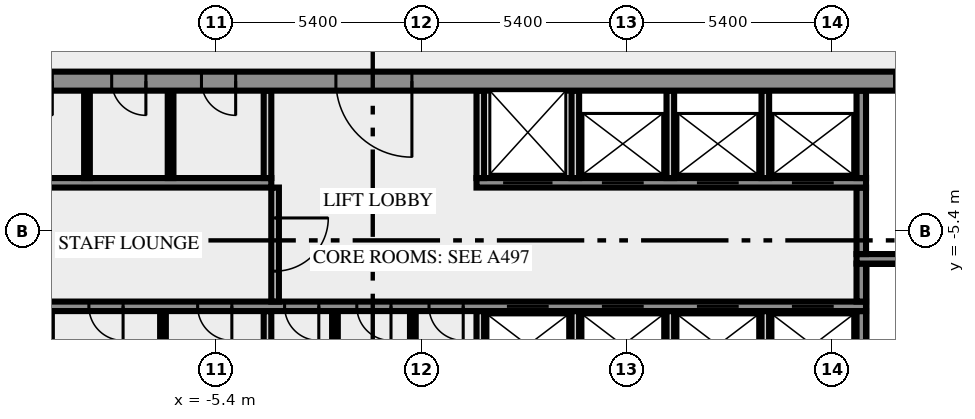
"""IFC4 building model, lengths in metres.
Left out: names, types, materials, properties, quantities, classifications, styles, units other than length and angle.
Written with IfcOpenShell. Run it as: python <this file> out.ifc"""

import sys

from ifc_helpers import new_model, si_unit, direction, frame, frame_2d, origin, place, context, subcontext, project, spatial, rectangle, extrude, element, fill, save


model = new_model("IFC4")
c1 = context("Model", 3, precision=1e-05, world=origin(), true_north=direction((0.0, 1.0)))
c2 = subcontext(c1, "Body", "Model", "MODEL_VIEW")
j1 = project(units=[si_unit("LENGTHUNIT", "METRE"), si_unit("PLANEANGLEUNIT", "RADIAN")], contexts=[c1])
p1 = place(None, origin())
s1 = spatial("IfcSite", under=j1, at=p1, CompositionType="ELEMENT")
p2 = place(p1, origin())
s2 = spatial("IfcBuilding", under=s1, at=p2, CompositionType="ELEMENT")
p3 = place(p2, frame((0.0, 0.0, 222.0)))
s3 = spatial("IfcBuildingStorey", under=s2, at=p3, CompositionType="ELEMENT", Elevation=222.0)
p4 = place(p3, frame((-6.8, -10.5, 0.0), z_axis=(0.0, 0.0, 1.0), x_axis=(0.0, 1.0, 0.0)))
e1 = element("IfcWall", 1, at=p4, inside=s3, PredefinedType="PARTITIONING", context=c2, shape_type="SweptSolid", body=[
    extrude(rectangle(XDim=3.0, YDim=0.15, at=frame_2d((1.5, 0.0))), origin(), (0.0, 0.0, 1.0), 3.65),
])
p5 = place(p3, frame((-4.05, -10.5, 0.0), z_axis=(0.0, 0.0, 1.0), x_axis=(0.0, 1.0, 0.0)))
e2 = element("IfcWall", 2, at=p5, inside=s3, PredefinedType="SOLIDWALL", context=c2, shape_type="SweptSolid", body=[
    extrude(rectangle(XDim=3.0, YDim=0.2, at=frame_2d((1.5, 0.0))), origin(), (0.0, 0.0, 1.0), 3.65),
])
for number, where, z_axis, x_axis in (
    (3, (-2.275, -10.5, 0.0), (0.0, 0.0, 1.0), (0.0, 1.0, 0.0)),
    (4, (-0.225, -10.5, 0.0), (0.0, 0.0, 1.0), (0.0, 1.0, 0.0)),
):
    element("IfcWall", number, at=place(p3, frame(where, z_axis=z_axis, x_axis=x_axis)), inside=s3, PredefinedType="PARTITIONING", context=c2, shape_type="SweptSolid", body=[
        extrude(rectangle(XDim=3.0, YDim=0.15, at=frame_2d((1.5, 0.0))), origin(), (0.0, 0.0, 1.0), 3.65),
    ])
for number, where, z_axis, x_axis in (
    (5, (1.55, -10.5, 0.0), (0.0, 0.0, 1.0), (0.0, 1.0, 0.0)),
    (6, (4.05, -10.5, 0.0), (0.0, 0.0, 1.0), (0.0, 1.0, 0.0)),
    (7, (6.55, -10.5, 0.0), (0.0, 0.0, 1.0), (0.0, 1.0, 0.0)),
    (8, (9.05, -10.5, 0.0), (0.0, 0.0, 1.0), (0.0, 1.0, 0.0)),
):
    element("IfcWall", number, at=place(p3, frame(where, z_axis=z_axis, x_axis=x_axis)), inside=s3, PredefinedType="SOLIDWALL", context=c2, shape_type="SweptSolid", body=[
        extrude(rectangle(XDim=3.0, YDim=0.2, at=frame_2d((1.5, 0.0))), origin(), (0.0, 0.0, 1.0), 3.65),
    ])
p6 = place(p3, frame((11.575, -10.5, 0.0), z_axis=(0.0, 0.0, 1.0), x_axis=(0.0, 1.0, 0.0)))
e9 = element("IfcWall", 9, at=p6, inside=s3, PredefinedType="SHEAR", context=c2, shape_type="SweptSolid", body=[
    extrude(rectangle(XDim=3.0, YDim=0.25, at=frame_2d((1.5, 0.0))), origin(), (0.0, 0.0, 1.0), 3.65),
])
p7 = place(p3, frame((11.7, -7.375, 0.0), z_axis=(0.0, 0.0, 1.0), x_axis=(-1.0, 0.0, 0.0)))
e10 = element("IfcWall", 10, at=p7, inside=s3, PredefinedType="SHEAR", context=c2, shape_type="SweptSolid", body=[
    extrude(rectangle(XDim=23.4, YDim=0.25, at=frame_2d((11.7, 0.0))), origin(), (0.0, 0.0, 1.0), 3.65),
])
p8 = place(p7, frame((21.912, 0.0, 0.0)))
e11 = element("IfcOpeningElement", 11, at=p8, cuts=e10, PredefinedType="OPENING", context=c2, shape_type="SweptSolid", body=[
    extrude(rectangle(XDim=0.9, YDim=2.1, at=frame_2d((0.45, 1.05))), frame((0.0, 0.135, 0.0), z_axis=(0.0, -1.0, 0.0), x_axis=(1.0, 0.0, 0.0)), (0.0, 0.0, 1.0), 0.27),
])
p9 = place(p7, frame((19.55, 0.0, 0.0)))
e12 = element("IfcOpeningElement", 12, at=p9, cuts=e10, PredefinedType="OPENING", context=c2, shape_type="SweptSolid", body=[
    extrude(rectangle(XDim=0.9, YDim=2.1, at=frame_2d((0.45, 1.05))), frame((0.0, 0.135, 0.0), z_axis=(0.0, -1.0, 0.0), x_axis=(1.0, 0.0, 0.0)), (0.0, 0.0, 1.0), 0.27),
])
p10 = place(p7, frame((16.688, 0.0, 0.0)))
e13 = element("IfcOpeningElement", 13, at=p10, cuts=e10, PredefinedType="OPENING", context=c2, shape_type="SweptSolid", body=[
    extrude(rectangle(XDim=0.9, YDim=2.1, at=frame_2d((0.45, 1.05))), frame((0.0, 0.135, 0.0), z_axis=(0.0, -1.0, 0.0), x_axis=(1.0, 0.0, 0.0)), (0.0, 0.0, 1.0), 0.27),
])
p11 = place(p7, frame((14.4, 0.0, 0.0)))
e14 = element("IfcOpeningElement", 14, at=p11, cuts=e10, PredefinedType="OPENING", context=c2, shape_type="SweptSolid", body=[
    extrude(rectangle(XDim=0.9, YDim=2.1, at=frame_2d((0.45, 1.05))), frame((0.0, 0.135, 0.0), z_axis=(0.0, -1.0, 0.0), x_axis=(1.0, 0.0, 0.0)), (0.0, 0.0, 1.0), 0.27),
])
p12 = place(p7, frame((12.5, 0.0, 0.0)))
e15 = element("IfcOpeningElement", 15, at=p12, cuts=e10, PredefinedType="OPENING", context=c2, shape_type="SweptSolid", body=[
    extrude(rectangle(XDim=0.9, YDim=2.1, at=frame_2d((0.45, 1.05))), frame((0.0, 0.135, 0.0), z_axis=(0.0, -1.0, 0.0), x_axis=(1.0, 0.0, 0.0)), (0.0, 0.0, 1.0), 0.27),
])
p13 = place(p7, frame((10.6, 0.0, 0.0)))
e16 = element("IfcOpeningElement", 16, at=p13, cuts=e10, PredefinedType="OPENING", context=c2, shape_type="SweptSolid", body=[
    extrude(rectangle(XDim=0.9, YDim=2.1, at=frame_2d((0.45, 1.05))), frame((0.0, 0.135, 0.0), z_axis=(0.0, -1.0, 0.0), x_axis=(1.0, 0.0, 0.0)), (0.0, 0.0, 1.0), 0.27),
])
p14 = place(p7, frame((8.35, 0.0, 0.0)))
e17 = element("IfcOpeningElement", 17, at=p14, cuts=e10, PredefinedType="OPENING", context=c2, shape_type="SweptSolid", body=[
    extrude(rectangle(XDim=1.1, YDim=2.1, at=frame_2d((0.55, 1.05))), frame((0.0, 0.135, 0.0), z_axis=(0.0, -1.0, 0.0), x_axis=(1.0, 0.0, 0.0)), (0.0, 0.0, 1.0), 0.27),
])
p15 = place(p7, frame((5.85, 0.0, 0.0)))
e18 = element("IfcOpeningElement", 18, at=p15, cuts=e10, PredefinedType="OPENING", context=c2, shape_type="SweptSolid", body=[
    extrude(rectangle(XDim=1.1, YDim=2.1, at=frame_2d((0.55, 1.05))), frame((0.0, 0.135, 0.0), z_axis=(0.0, -1.0, 0.0), x_axis=(1.0, 0.0, 0.0)), (0.0, 0.0, 1.0), 0.27),
])
p16 = place(p7, frame((3.35, 0.0, 0.0)))
e19 = element("IfcOpeningElement", 19, at=p16, cuts=e10, PredefinedType="OPENING", context=c2, shape_type="SweptSolid", body=[
    extrude(rectangle(XDim=1.1, YDim=2.1, at=frame_2d((0.55, 1.05))), frame((0.0, 0.135, 0.0), z_axis=(0.0, -1.0, 0.0), x_axis=(1.0, 0.0, 0.0)), (0.0, 0.0, 1.0), 0.27),
])
p17 = place(p7, frame((0.85, 0.0, 0.0)))
e20 = element("IfcOpeningElement", 20, at=p17, cuts=e10, PredefinedType="OPENING", context=c2, shape_type="SweptSolid", body=[
    extrude(rectangle(XDim=1.1, YDim=2.1, at=frame_2d((0.55, 1.05))), frame((0.0, 0.135, 0.0), z_axis=(0.0, -1.0, 0.0), x_axis=(1.0, 0.0, 0.0)), (0.0, 0.0, 1.0), 0.27),
])
p18 = place(p3, frame((-3.85, -4.25, 0.0), z_axis=(0.0, 0.0, 1.0), x_axis=(0.0, -1.0, 0.0)))
e21 = element("IfcWall", 21, at=p18, inside=s3, PredefinedType="SOLIDWALL", context=c2, shape_type="SweptSolid", body=[
    extrude(rectangle(XDim=3.0, YDim=0.2, at=frame_2d((1.5, 0.0))), origin(), (0.0, 0.0, 1.0), 3.65),
])
p19 = place(p18, frame((0.8, 0.0, 0.0)))
e22 = element("IfcOpeningElement", 22, at=p19, cuts=e21, PredefinedType="OPENING", context=c2, shape_type="SweptSolid", body=[
    extrude(rectangle(XDim=1.4, YDim=2.1, at=frame_2d((0.7, 1.05))), frame((0.0, 0.11, 0.0), z_axis=(0.0, -1.0, 0.0), x_axis=(1.0, 0.0, 0.0)), (0.0, 0.0, 1.0), 0.22),
])
p20 = place(p3, frame((11.575, -7.25, 0.0), z_axis=(0.0, 0.0, 1.0), x_axis=(0.0, 1.0, 0.0)))
e23 = element("IfcWall", 23, at=p20, inside=s3, PredefinedType="SHEAR", context=c2, shape_type="SweptSolid", body=[
    extrude(rectangle(XDim=1.0, YDim=0.25, at=frame_2d((0.5, 0.0))), origin(), (0.0, 0.0, 1.0), 3.65),
])
p21 = place(p3, frame((19.5, -6.125, 0.0), z_axis=(0.0, 0.0, 1.0), x_axis=(-1.0, 0.0, 0.0)))
e24 = element("IfcWall", 24, at=p21, inside=s3, PredefinedType="SHEAR", context=c2, shape_type="SweptSolid", body=[
    extrude(rectangle(XDim=8.05, YDim=0.25, at=frame_2d((4.025, 0.0))), origin(), (0.0, 0.0, 1.0), 3.65),
])
p22 = place(p21, frame((0.05, 0.0, 0.0)))
e25 = element("IfcOpeningElement", 25, at=p22, cuts=e24, PredefinedType="OPENING", context=c2, shape_type="SweptSolid", body=[
    extrude(rectangle(XDim=1.8, YDim=2.1, at=frame_2d((0.9, 1.05))), frame((0.0, 0.135, 0.0), z_axis=(0.0, -1.0, 0.0), x_axis=(1.0, 0.0, 0.0)), (0.0, 0.0, 1.0), 0.27),
])
p23 = place(p3, frame((11.575, -6.0, 0.0), z_axis=(0.0, 0.0, 1.0), x_axis=(0.0, 1.0, 0.0)))
e26 = element("IfcWall", 26, at=p23, inside=s3, PredefinedType="SHEAR", context=c2, shape_type="SweptSolid", body=[
    extrude(rectangle(XDim=1.75, YDim=0.25, at=frame_2d((0.875, 0.0))), origin(), (0.0, 0.0, 1.0), 3.65),
])
p24 = place(p3, frame((-11.7, -4.125, 0.0), z_axis=(0.0, 0.0, 1.0), x_axis=(1.0, 0.0, 0.0)))
e27 = element("IfcWall", 27, at=p24, inside=s3, PredefinedType="SHEAR", context=c2, shape_type="SweptSolid", body=[
    extrude(rectangle(XDim=7.75, YDim=0.25, at=frame_2d((3.875, 0.0))), origin(), (0.0, 0.0, 1.0), 3.65),
])
p25 = place(p3, frame((1.45, -4.125, 0.0), z_axis=(0.0, 0.0, 1.0), x_axis=(1.0, 0.0, 0.0)))
e28 = element("IfcWall", 28, at=p25, inside=s3, PredefinedType="SHEAR", context=c2, shape_type="SweptSolid", body=[
    extrude(rectangle(XDim=10.25, YDim=0.25, at=frame_2d((5.125, 0.0))), origin(), (0.0, 0.0, 1.0), 3.65),
])
p26 = place(p25, frame((0.7, 0.0, 0.0)))
e29 = element("IfcOpeningElement", 29, at=p26, cuts=e28, PredefinedType="OPENING", context=c2, shape_type="SweptSolid", body=[
    extrude(rectangle(XDim=1.3, YDim=2.1, at=frame_2d((0.65, 1.05))), frame((0.0, 0.135, 0.0), z_axis=(0.0, -1.0, 0.0), x_axis=(1.0, 0.0, 0.0)), (0.0, 0.0, 1.0), 0.27),
])
p27 = place(p25, frame((3.3, 0.0, 0.0)))
e30 = element("IfcOpeningElement", 30, at=p27, cuts=e28, PredefinedType="OPENING", context=c2, shape_type="SweptSolid", body=[
    extrude(rectangle(XDim=1.1, YDim=2.1, at=frame_2d((0.55, 1.05))), frame((0.0, 0.135, 0.0), z_axis=(0.0, -1.0, 0.0), x_axis=(1.0, 0.0, 0.0)), (0.0, 0.0, 1.0), 0.27),
])
p28 = place(p25, frame((5.8, 0.0, 0.0)))
e31 = element("IfcOpeningElement", 31, at=p28, cuts=e28, PredefinedType="OPENING", context=c2, shape_type="SweptSolid", body=[
    extrude(rectangle(XDim=1.1, YDim=2.1, at=frame_2d((0.55, 1.05))), frame((0.0, 0.135, 0.0), z_axis=(0.0, -1.0, 0.0), x_axis=(1.0, 0.0, 0.0)), (0.0, 0.0, 1.0), 0.27),
])
p29 = place(p25, frame((8.3, 0.0, 0.0)))
e32 = element("IfcOpeningElement", 32, at=p29, cuts=e28, PredefinedType="OPENING", context=c2, shape_type="SweptSolid", body=[
    extrude(rectangle(XDim=1.1, YDim=2.1, at=frame_2d((0.55, 1.05))), frame((0.0, 0.135, 0.0), z_axis=(0.0, -1.0, 0.0), x_axis=(1.0, 0.0, 0.0)), (0.0, 0.0, 1.0), 0.27),
])
for number, where, z_axis, x_axis in (
    (33, (-8.8, -4.0, 0.0), (0.0, 0.0, 1.0), (0.0, 1.0, 0.0)),
    (34, (-6.6, -4.0, 0.0), (0.0, 0.0, 1.0), (0.0, 1.0, 0.0)),
):
    element("IfcWall", number, at=place(p3, frame(where, z_axis=z_axis, x_axis=x_axis)), inside=s3, PredefinedType="PARTITIONING", context=c2, shape_type="SweptSolid", body=[
        extrude(rectangle(XDim=2.3, YDim=0.15, at=frame_2d((1.15, 0.0))), origin(), (0.0, 0.0, 1.0), 3.65),
    ])
for number, where, z_axis, x_axis in (
    (35, (-4.05, -4.0, 0.0), (0.0, 0.0, 1.0), (0.0, 1.0, 0.0)),
    (36, (1.55, -4.0, 0.0), (0.0, 0.0, 1.0), (0.0, 1.0, 0.0)),
    (37, (4.05, -4.0, 0.0), (0.0, 0.0, 1.0), (0.0, 1.0, 0.0)),
    (38, (6.55, -4.0, 0.0), (0.0, 0.0, 1.0), (0.0, 1.0, 0.0)),
    (39, (9.05, -4.0, 0.0), (0.0, 0.0, 1.0), (0.0, 1.0, 0.0)),
):
    element("IfcWall", number, at=place(p3, frame(where, z_axis=z_axis, x_axis=x_axis)), inside=s3, PredefinedType="SOLIDWALL", context=c2, shape_type="SweptSolid", body=[
        extrude(rectangle(XDim=2.3, YDim=0.2, at=frame_2d((1.15, 0.0))), origin(), (0.0, 0.0, 1.0), 3.65),
    ])
p30 = place(p3, frame((11.575, -4.0, 0.0), z_axis=(0.0, 0.0, 1.0), x_axis=(0.0, 1.0, 0.0)))
e40 = element("IfcWall", 40, at=p30, inside=s3, PredefinedType="SHEAR", context=c2, shape_type="SweptSolid", body=[
    extrude(rectangle(XDim=2.3, YDim=0.25, at=frame_2d((1.15, 0.0))), origin(), (0.0, 0.0, 1.0), 3.65),
])
p31 = place(p3, frame((20.49, -1.45, 0.0), z_axis=(0.0, 0.0, 1.0), x_axis=(-1.0, 0.0, 0.0)))
e41 = element("IfcWall", 41, at=p31, inside=s3, PredefinedType="SHEAR", context=c2, shape_type="SweptSolid", body=[
    extrude(rectangle(XDim=40.98, YDim=0.5, at=frame_2d((20.49, 0.0))), origin(), (0.0, 0.0, 1.0), 3.65),
])
p32 = place(p31, frame((38.14, 0.0, 0.0)))
e42 = element("IfcOpeningElement", 42, at=p32, cuts=e41, PredefinedType="OPENING", context=c2, shape_type="SweptSolid", body=[
    extrude(rectangle(XDim=1.8, YDim=2.1, at=frame_2d((0.9, 1.05))), frame((0.0, 0.26, 0.0), z_axis=(0.0, -1.0, 0.0), x_axis=(1.0, 0.0, 0.0)), (0.0, 0.0, 1.0), 0.52),
])
p33 = place(p31, frame((36.728, 0.0, 0.0)))
e43 = element("IfcOpeningElement", 43, at=p33, cuts=e41, PredefinedType="OPENING", context=c2, shape_type="SweptSolid", body=[
    extrude(rectangle(XDim=0.8, YDim=2.1, at=frame_2d((0.4, 1.05))), frame((0.0, 0.26, 0.0), z_axis=(0.0, -1.0, 0.0), x_axis=(1.0, 0.0, 0.0)), (0.0, 0.0, 1.0), 0.52),
])
p34 = place(p31, frame((35.153, 0.0, 0.0)))
e44 = element("IfcOpeningElement", 44, at=p34, cuts=e41, PredefinedType="OPENING", context=c2, shape_type="SweptSolid", body=[
    extrude(rectangle(XDim=0.8, YDim=2.1, at=frame_2d((0.4, 1.05))), frame((0.0, 0.26, 0.0), z_axis=(0.0, -1.0, 0.0), x_axis=(1.0, 0.0, 0.0)), (0.0, 0.0, 1.0), 0.52),
])
p35 = place(p31, frame((32.94, 0.0, 0.0)))
e45 = element("IfcOpeningElement", 45, at=p35, cuts=e41, PredefinedType="OPENING", context=c2, shape_type="SweptSolid", body=[
    extrude(rectangle(XDim=0.9, YDim=2.1, at=frame_2d((0.45, 1.05))), frame((0.0, 0.26, 0.0), z_axis=(0.0, -1.0, 0.0), x_axis=(1.0, 0.0, 0.0)), (0.0, 0.0, 1.0), 0.52),
])
p36 = place(p31, frame((30.202, 0.0, 0.0)))
e46 = element("IfcOpeningElement", 46, at=p36, cuts=e41, PredefinedType="OPENING", context=c2, shape_type="SweptSolid", body=[
    extrude(rectangle(XDim=0.9, YDim=2.1, at=frame_2d((0.45, 1.05))), frame((0.0, 0.26, 0.0), z_axis=(0.0, -1.0, 0.0), x_axis=(1.0, 0.0, 0.0)), (0.0, 0.0, 1.0), 0.52),
])
p37 = place(p31, frame((27.74, 0.0, 0.0)))
e47 = element("IfcOpeningElement", 47, at=p37, cuts=e41, PredefinedType="OPENING", context=c2, shape_type="SweptSolid", body=[
    extrude(rectangle(XDim=0.9, YDim=2.1, at=frame_2d((0.45, 1.05))), frame((0.0, 0.26, 0.0), z_axis=(0.0, -1.0, 0.0), x_axis=(1.0, 0.0, 0.0)), (0.0, 0.0, 1.0), 0.52),
])
p38 = place(p31, frame((25.377, 0.0, 0.0)))
e48 = element("IfcOpeningElement", 48, at=p38, cuts=e41, PredefinedType="OPENING", context=c2, shape_type="SweptSolid", body=[
    extrude(rectangle(XDim=0.9, YDim=2.1, at=frame_2d((0.45, 1.05))), frame((0.0, 0.26, 0.0), z_axis=(0.0, -1.0, 0.0), x_axis=(1.0, 0.0, 0.0)), (0.0, 0.0, 1.0), 0.52),
])
p39 = place(p31, frame((20.74, 0.0, 0.0)))
e49 = element("IfcOpeningElement", 49, at=p39, cuts=e41, PredefinedType="OPENING", context=c2, shape_type="SweptSolid", body=[
    extrude(rectangle(XDim=2.0, YDim=2.1, at=frame_2d((1.0, 1.05))), frame((0.0, 0.26, 0.0), z_axis=(0.0, -1.0, 0.0), x_axis=(1.0, 0.0, 0.0)), (0.0, 0.0, 1.0), 0.52),
])
p40 = place(p31, frame((7.14, 0.0, 0.0)))
e50 = element("IfcOpeningElement", 50, at=p40, cuts=e41, PredefinedType="OPENING", context=c2, shape_type="SweptSolid", body=[
    extrude(rectangle(XDim=0.9, YDim=2.1, at=frame_2d((0.45, 1.05))), frame((0.0, 0.26, 0.0), z_axis=(0.0, -1.0, 0.0), x_axis=(1.0, 0.0, 0.0)), (0.0, 0.0, 1.0), 0.52),
])
p41 = place(p31, frame((4.19, 0.0, 0.0)))
e51 = element("IfcOpeningElement", 51, at=p41, cuts=e41, PredefinedType="OPENING", context=c2, shape_type="SweptSolid", body=[
    extrude(rectangle(XDim=0.9, YDim=2.1, at=frame_2d((0.45, 1.05))), frame((0.0, 0.26, 0.0), z_axis=(0.0, -1.0, 0.0), x_axis=(1.0, 0.0, 0.0)), (0.0, 0.0, 1.0), 0.52),
])
p42 = place(p31, frame((1.04, 0.0, 0.0)))
e52 = element("IfcOpeningElement", 52, at=p42, cuts=e41, PredefinedType="OPENING", context=c2, shape_type="SweptSolid", body=[
    extrude(rectangle(XDim=1.8, YDim=2.1, at=frame_2d((0.9, 1.05))), frame((0.0, 0.26, 0.0), z_axis=(0.0, -1.0, 0.0), x_axis=(1.0, 0.0, 0.0)), (0.0, 0.0, 1.0), 0.52),
])
p43 = place(p9, origin())
e53 = element("IfcDoor", 53, at=p43, inside=s3, OperationType="SINGLE_SWING_RIGHT", PredefinedType="DOOR", context=c2, shape_type="SweptSolid", body=[
    extrude(rectangle(XDim=0.9, YDim=2.1, at=frame_2d((0.45, 1.05))), frame((0.0, 0.025, 0.0), z_axis=(0.0, -1.0, 0.0), x_axis=(1.0, 0.0, 0.0)), (0.0, 0.0, 1.0), 0.05),
])
fill(e12, e53)
p44 = place(p10, origin())
e54 = element("IfcDoor", 54, at=p44, inside=s3, OperationType="SINGLE_SWING_RIGHT", PredefinedType="DOOR", context=c2, shape_type="SweptSolid", body=[
    extrude(rectangle(XDim=0.9, YDim=2.1, at=frame_2d((0.45, 1.05))), frame((0.0, 0.025, 0.0), z_axis=(0.0, -1.0, 0.0), x_axis=(1.0, 0.0, 0.0)), (0.0, 0.0, 1.0), 0.05),
])
fill(e13, e54)
p45 = place(p11, origin())
e55 = element("IfcDoor", 55, at=p45, inside=s3, OperationType="SINGLE_SWING_RIGHT", PredefinedType="DOOR", context=c2, shape_type="SweptSolid", body=[
    extrude(rectangle(XDim=0.9, YDim=2.1, at=frame_2d((0.45, 1.05))), frame((0.0, 0.025, 0.0), z_axis=(0.0, -1.0, 0.0), x_axis=(1.0, 0.0, 0.0)), (0.0, 0.0, 1.0), 0.05),
])
fill(e14, e55)
p46 = place(p12, origin())
e56 = element("IfcDoor", 56, at=p46, inside=s3, OperationType="SINGLE_SWING_RIGHT", PredefinedType="DOOR", context=c2, shape_type="SweptSolid", body=[
    extrude(rectangle(XDim=0.9, YDim=2.1, at=frame_2d((0.45, 1.05))), frame((0.0, 0.025, 0.0), z_axis=(0.0, -1.0, 0.0), x_axis=(1.0, 0.0, 0.0)), (0.0, 0.0, 1.0), 0.05),
])
fill(e15, e56)
p47 = place(p13, origin())
e57 = element("IfcDoor", 57, at=p47, inside=s3, OperationType="SINGLE_SWING_LEFT", PredefinedType="DOOR", context=c2, shape_type="SweptSolid", body=[
    extrude(rectangle(XDim=0.9, YDim=2.1, at=frame_2d((0.45, 1.05))), frame((0.0, 0.025, 0.0), z_axis=(0.0, -1.0, 0.0), x_axis=(1.0, 0.0, 0.0)), (0.0, 0.0, 1.0), 0.05),
])
fill(e16, e57)
p48 = place(p14, origin())
e58 = element("IfcDoor", 58, at=p48, inside=s3, OperationType="DOUBLE_DOOR_SLIDING", PredefinedType="DOOR", context=c2, shape_type="SweptSolid", body=[
    extrude(rectangle(XDim=1.1, YDim=2.1, at=frame_2d((0.55, 1.05))), frame((0.0, 0.025, 0.0), z_axis=(0.0, -1.0, 0.0), x_axis=(1.0, 0.0, 0.0)), (0.0, 0.0, 1.0), 0.05),
])
fill(e17, e58)
p49 = place(p15, origin())
e59 = element("IfcDoor", 59, at=p49, inside=s3, OperationType="DOUBLE_DOOR_SLIDING", PredefinedType="DOOR", context=c2, shape_type="SweptSolid", body=[
    extrude(rectangle(XDim=1.1, YDim=2.1, at=frame_2d((0.55, 1.05))), frame((0.0, 0.025, 0.0), z_axis=(0.0, -1.0, 0.0), x_axis=(1.0, 0.0, 0.0)), (0.0, 0.0, 1.0), 0.05),
])
fill(e18, e59)
p50 = place(p16, origin())
e60 = element("IfcDoor", 60, at=p50, inside=s3, OperationType="DOUBLE_DOOR_SLIDING", PredefinedType="DOOR", context=c2, shape_type="SweptSolid", body=[
    extrude(rectangle(XDim=1.1, YDim=2.1, at=frame_2d((0.55, 1.05))), frame((0.0, 0.025, 0.0), z_axis=(0.0, -1.0, 0.0), x_axis=(1.0, 0.0, 0.0)), (0.0, 0.0, 1.0), 0.05),
])
fill(e19, e60)
p51 = place(p17, origin())
e61 = element("IfcDoor", 61, at=p51, inside=s3, OperationType="DOUBLE_DOOR_SLIDING", PredefinedType="DOOR", context=c2, shape_type="SweptSolid", body=[
    extrude(rectangle(XDim=1.1, YDim=2.1, at=frame_2d((0.55, 1.05))), frame((0.0, 0.025, 0.0), z_axis=(0.0, -1.0, 0.0), x_axis=(1.0, 0.0, 0.0)), (0.0, 0.0, 1.0), 0.05),
])
fill(e20, e61)
p52 = place(p19, origin())
e62 = element("IfcDoor", 62, at=p52, inside=s3, OperationType="DOUBLE_DOOR_SINGLE_SWING", PredefinedType="DOOR", context=c2, shape_type="SweptSolid", body=[
    extrude(rectangle(XDim=1.4, YDim=2.1, at=frame_2d((0.7, 1.05))), frame((0.0, 0.025, 0.0), z_axis=(0.0, -1.0, 0.0), x_axis=(1.0, 0.0, 0.0)), (0.0, 0.0, 1.0), 0.05),
])
fill(e22, e62)
p53 = place(p26, origin())
e63 = element("IfcDoor", 63, at=p53, inside=s3, OperationType="DOUBLE_DOOR_SLIDING", PredefinedType="DOOR", context=c2, shape_type="SweptSolid", body=[
    extrude(rectangle(XDim=1.3, YDim=2.1, at=frame_2d((0.65, 1.05))), frame((0.0, 0.025, 0.0), z_axis=(0.0, -1.0, 0.0), x_axis=(1.0, 0.0, 0.0)), (0.0, 0.0, 1.0), 0.05),
])
fill(e29, e63)
p54 = place(p27, origin())
e64 = element("IfcDoor", 64, at=p54, inside=s3, OperationType="DOUBLE_DOOR_SLIDING", PredefinedType="DOOR", context=c2, shape_type="SweptSolid", body=[
    extrude(rectangle(XDim=1.1, YDim=2.1, at=frame_2d((0.55, 1.05))), frame((0.0, 0.025, 0.0), z_axis=(0.0, -1.0, 0.0), x_axis=(1.0, 0.0, 0.0)), (0.0, 0.0, 1.0), 0.05),
])
fill(e30, e64)
p55 = place(p28, origin())
e65 = element("IfcDoor", 65, at=p55, inside=s3, OperationType="DOUBLE_DOOR_SLIDING", PredefinedType="DOOR", context=c2, shape_type="SweptSolid", body=[
    extrude(rectangle(XDim=1.1, YDim=2.1, at=frame_2d((0.55, 1.05))), frame((0.0, 0.025, 0.0), z_axis=(0.0, -1.0, 0.0), x_axis=(1.0, 0.0, 0.0)), (0.0, 0.0, 1.0), 0.05),
])
fill(e31, e65)
p56 = place(p29, origin())
e66 = element("IfcDoor", 66, at=p56, inside=s3, OperationType="DOUBLE_DOOR_SLIDING", PredefinedType="DOOR", context=c2, shape_type="SweptSolid", body=[
    extrude(rectangle(XDim=1.1, YDim=2.1, at=frame_2d((0.55, 1.05))), frame((0.0, 0.025, 0.0), z_axis=(0.0, -1.0, 0.0), x_axis=(1.0, 0.0, 0.0)), (0.0, 0.0, 1.0), 0.05),
])
fill(e32, e66)
p57 = place(p36, origin())
e67 = element("IfcDoor", 67, at=p57, inside=s3, OperationType="SINGLE_SWING_RIGHT", PredefinedType="DOOR", context=c2, shape_type="SweptSolid", body=[
    extrude(rectangle(XDim=0.9, YDim=2.1, at=frame_2d((0.45, 1.05))), frame((0.0, 0.025, 0.0), z_axis=(0.0, -1.0, 0.0), x_axis=(1.0, 0.0, 0.0)), (0.0, 0.0, 1.0), 0.05),
])
fill(e46, e67)
p58 = place(p37, origin())
e68 = element("IfcDoor", 68, at=p58, inside=s3, OperationType="SINGLE_SWING_RIGHT", PredefinedType="DOOR", context=c2, shape_type="SweptSolid", body=[
    extrude(rectangle(XDim=0.9, YDim=2.1, at=frame_2d((0.45, 1.05))), frame((0.0, 0.025, 0.0), z_axis=(0.0, -1.0, 0.0), x_axis=(1.0, 0.0, 0.0)), (0.0, 0.0, 1.0), 0.05),
])
fill(e47, e68)
p59 = place(p38, origin())
e69 = element("IfcDoor", 69, at=p59, inside=s3, OperationType="SINGLE_SWING_RIGHT", PredefinedType="DOOR", context=c2, shape_type="SweptSolid", body=[
    extrude(rectangle(XDim=0.9, YDim=2.1, at=frame_2d((0.45, 1.05))), frame((0.0, 0.025, 0.0), z_axis=(0.0, -1.0, 0.0), x_axis=(1.0, 0.0, 0.0)), (0.0, 0.0, 1.0), 0.05),
])
fill(e48, e69)
p60 = place(p39, origin())
e70 = element("IfcDoor", 70, at=p60, inside=s3, OperationType="DOUBLE_DOOR_SINGLE_SWING", PredefinedType="DOOR", context=c2, shape_type="SweptSolid", body=[
    extrude(rectangle(XDim=2.0, YDim=2.1, at=frame_2d((1.0, 1.05))), frame((0.0, 0.025, 0.0), z_axis=(0.0, -1.0, 0.0), x_axis=(1.0, 0.0, 0.0)), (0.0, 0.0, 1.0), 0.05),
])
fill(e49, e70)
save(model, sys.argv[1])
